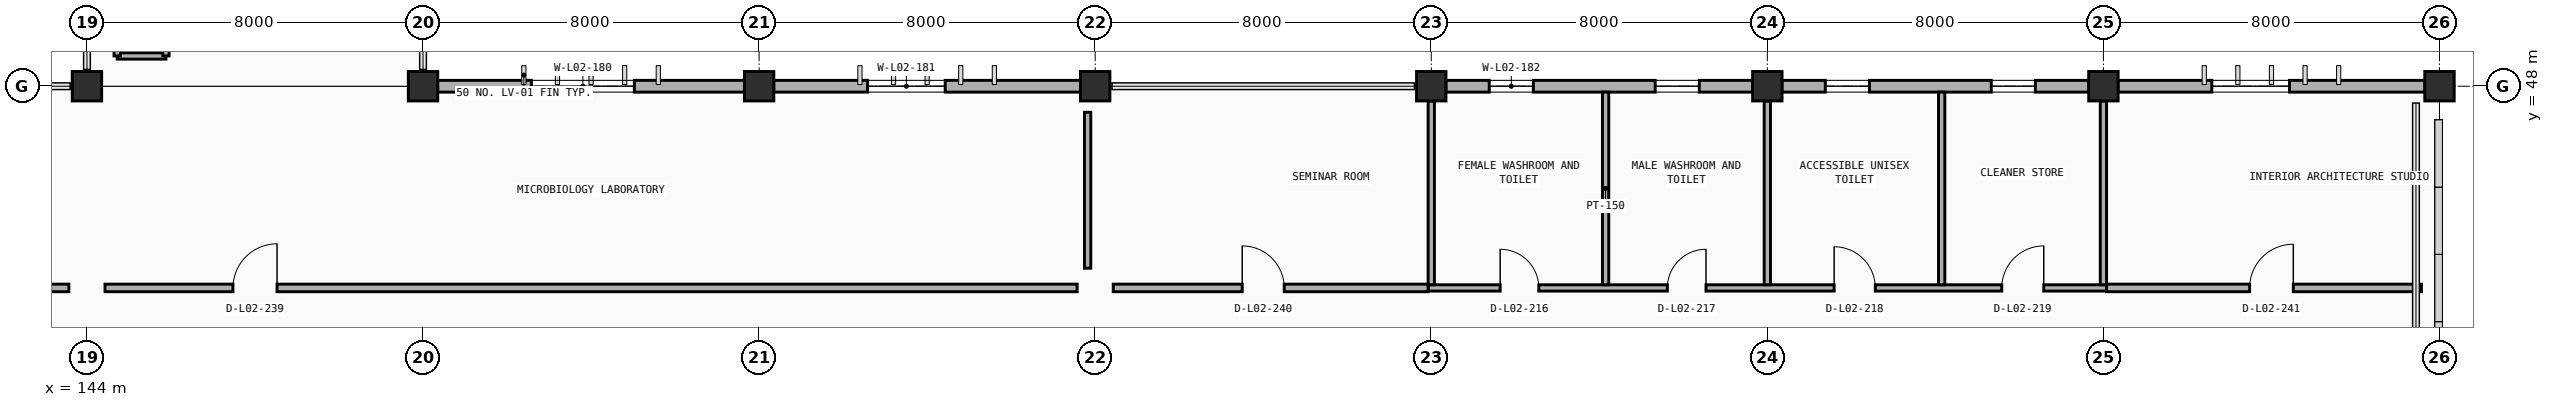
"""IFC4 building model, lengths in metres.
Left out: names, types, materials, properties, quantities, classifications, styles, units other than length and angle.
Written with IfcOpenShell. Run it as: python <this file> out.ifc"""

import sys

from ifc_helpers import new_model, si_unit, direction, frame, frame_2d, origin, origin_2d, place, context, subcontext, project, spatial, rectangle, extrude, element, fill, save


model = new_model("IFC4")
c1 = context("Model", 3, precision=1e-05, world=origin(), true_north=direction((0.0, 1.0)))
c2 = subcontext(c1, "Body", "Model", "MODEL_VIEW")
j1 = project(units=[si_unit("LENGTHUNIT", "METRE"), si_unit("PLANEANGLEUNIT", "RADIAN")], contexts=[c1])
p1 = place(None, origin())
s1 = spatial("IfcSite", under=j1, at=p1, CompositionType="ELEMENT")
p2 = place(p1, origin())
s2 = spatial("IfcBuilding", under=s1, at=p2, CompositionType="ELEMENT")
p3 = place(p2, frame((0.0, 0.0, 4.8)))
s3 = spatial("IfcBuildingStorey", under=s2, at=p3, CompositionType="ELEMENT", Elevation=4.8)
for number, where, z_axis, x_axis in (
    (1, (144.0, 48.0, 0.0), (0.0, 0.0, 1.0), (1.0, 0.0, 0.0)),
    (2, (152.0, 48.0, 0.0), (0.0, 0.0, 1.0), (1.0, 0.0, 0.0)),
    (3, (160.0, 48.0, 0.0), (0.0, 0.0, 1.0), (1.0, 0.0, 0.0)),
    (4, (168.0, 48.0, 0.0), (0.0, 0.0, 1.0), (1.0, 0.0, 0.0)),
    (5, (176.0, 48.0, 0.0), (0.0, 0.0, 1.0), (1.0, 0.0, 0.0)),
    (6, (184.0, 48.0, 0.0), (0.0, 0.0, 1.0), (1.0, 0.0, 0.0)),
    (7, (192.0, 48.0, 0.0), (0.0, 0.0, 1.0), (1.0, 0.0, 0.0)),
    (8, (200.0, 48.0, 0.0), (0.0, 0.0, 1.0), (1.0, 0.0, 0.0)),
):
    element("IfcColumn", number, at=place(p3, frame(where, z_axis=z_axis, x_axis=x_axis)), inside=s3, PredefinedType="COLUMN", context=c2, shape_type="SweptSolid", body=[
        extrude(rectangle(XDim=0.7, YDim=0.7, at=origin_2d()), origin(), (0.0, 0.0, 1.0), 4.8),
    ])
p4 = place(p3, frame((152.347, 48.0, 0.0), z_axis=(0.0, 0.0, 1.0), x_axis=(1.0, 0.0, 0.0)))
e9 = element("IfcWall", 9, at=p4, inside=s3, PredefinedType="STANDARD", context=c2, shape_type="SweptSolid", body=[
    extrude(rectangle(XDim=7.306, YDim=0.28, at=frame_2d((3.653, 0.0))), origin(), (0.0, 0.0, 1.0), 3.91),
])
p5 = place(p4, frame((2.233, 0.0, 0.9)))
e10 = element("IfcOpeningElement", 10, at=p5, cuts=e9, PredefinedType="OPENING", context=c2, shape_type="SweptSolid", body=[
    extrude(rectangle(XDim=2.45, YDim=1.7, at=frame_2d((1.225, 0.85))), frame((0.0, 0.15, 0.0), z_axis=(0.0, -1.0, 0.0), x_axis=(1.0, 0.0, 0.0)), (0.0, 0.0, 1.0), 0.3),
])
p6 = place(p3, frame((160.347, 48.0, 0.0), z_axis=(0.0, 0.0, 1.0), x_axis=(1.0, 0.0, 0.0)))
e11 = element("IfcWall", 11, at=p6, inside=s3, PredefinedType="STANDARD", context=c2, shape_type="SweptSolid", body=[
    extrude(rectangle(XDim=7.306, YDim=0.28, at=frame_2d((3.653, 0.0))), origin(), (0.0, 0.0, 1.0), 3.91),
])
p7 = place(p6, frame((2.233, 0.0, 0.9)))
e12 = element("IfcOpeningElement", 12, at=p7, cuts=e11, PredefinedType="OPENING", context=c2, shape_type="SweptSolid", body=[
    extrude(rectangle(XDim=1.85, YDim=1.7, at=frame_2d((0.925, 0.85))), frame((0.0, 0.15, 0.0), z_axis=(0.0, -1.0, 0.0), x_axis=(1.0, 0.0, 0.0)), (0.0, 0.0, 1.0), 0.3),
])
p8 = place(p3, frame((176.347, 48.0, 0.0), z_axis=(0.0, 0.0, 1.0), x_axis=(1.0, 0.0, 0.0)))
e13 = element("IfcWall", 13, at=p8, inside=s3, PredefinedType="STANDARD", context=c2, shape_type="SweptSolid", body=[
    extrude(rectangle(XDim=7.306, YDim=0.28, at=frame_2d((3.653, 0.0))), origin(), (0.0, 0.0, 1.0), 3.91),
])
p9 = place(p8, frame((1.033, 0.0, 1.15)))
e14 = element("IfcOpeningElement", 14, at=p9, cuts=e13, PredefinedType="OPENING", context=c2, shape_type="SweptSolid", body=[
    extrude(rectangle(XDim=1.05, YDim=1.25, at=frame_2d((0.525, 0.625))), frame((0.0, 0.15, 0.0), z_axis=(0.0, -1.0, 0.0), x_axis=(1.0, 0.0, 0.0)), (0.0, 0.0, 1.0), 0.3),
])
p10 = place(p8, frame((4.983, 0.0, 1.15)))
e15 = element("IfcOpeningElement", 15, at=p10, cuts=e13, PredefinedType="OPENING", context=c2, shape_type="SweptSolid", body=[
    extrude(rectangle(XDim=1.05, YDim=1.25, at=frame_2d((0.525, 0.625))), frame((0.0, 0.15, 0.0), z_axis=(0.0, -1.0, 0.0), x_axis=(1.0, 0.0, 0.0)), (0.0, 0.0, 1.0), 0.3),
])
p11 = place(p3, frame((184.347, 48.0, 0.0), z_axis=(0.0, 0.0, 1.0), x_axis=(1.0, 0.0, 0.0)))
e16 = element("IfcWall", 16, at=p11, inside=s3, PredefinedType="STANDARD", context=c2, shape_type="SweptSolid", body=[
    extrude(rectangle(XDim=7.306, YDim=0.28, at=frame_2d((3.653, 0.0))), origin(), (0.0, 0.0, 1.0), 3.91),
])
p12 = place(p11, frame((1.033, 0.0, 1.15)))
e17 = element("IfcOpeningElement", 17, at=p12, cuts=e16, PredefinedType="OPENING", context=c2, shape_type="SweptSolid", body=[
    extrude(rectangle(XDim=1.05, YDim=1.25, at=frame_2d((0.525, 0.625))), frame((0.0, 0.15, 0.0), z_axis=(0.0, -1.0, 0.0), x_axis=(1.0, 0.0, 0.0)), (0.0, 0.0, 1.0), 0.3),
])
p13 = place(p11, frame((4.983, 0.0, 1.15)))
e18 = element("IfcOpeningElement", 18, at=p13, cuts=e16, PredefinedType="OPENING", context=c2, shape_type="SweptSolid", body=[
    extrude(rectangle(XDim=1.05, YDim=1.25, at=frame_2d((0.525, 0.625))), frame((0.0, 0.15, 0.0), z_axis=(0.0, -1.0, 0.0), x_axis=(1.0, 0.0, 0.0)), (0.0, 0.0, 1.0), 0.3),
])
p14 = place(p3, frame((192.347, 48.0, 0.0), z_axis=(0.0, 0.0, 1.0), x_axis=(1.0, 0.0, 0.0)))
e19 = element("IfcWall", 19, at=p14, inside=s3, PredefinedType="STANDARD", context=c2, shape_type="SweptSolid", body=[
    extrude(rectangle(XDim=7.306, YDim=0.28, at=frame_2d((3.653, 0.0))), origin(), (0.0, 0.0, 1.0), 3.91),
])
p15 = place(p14, frame((2.233, 0.0, 0.9)))
e20 = element("IfcOpeningElement", 20, at=p15, cuts=e19, PredefinedType="OPENING", context=c2, shape_type="SweptSolid", body=[
    extrude(rectangle(XDim=1.85, YDim=1.7, at=frame_2d((0.925, 0.85))), frame((0.0, 0.15, 0.0), z_axis=(0.0, -1.0, 0.0), x_axis=(1.0, 0.0, 0.0)), (0.0, 0.0, 1.0), 0.3),
])
p16 = place(p3, frame((199.76, 47.78, 0.0), z_axis=(0.0, 0.0, 1.0), x_axis=(-1.0, 0.0, 0.0)))
e21 = element("IfcWall", 21, at=p16, inside=s3, PredefinedType="PARAPET", context=c2, shape_type="SweptSolid", body=[
    extrude(rectangle(XDim=0.32, YDim=0.2, at=frame_2d((0.16, 0.0))), origin(), (0.0, 0.0, 1.0), 3.95),
])
for number, where, z_axis, x_axis in (
    (22, (144.72, 48.72, 0.0), (0.0, 0.0, 1.0), (1.0, 0.0, 0.0)),
    (23, (145.88, 48.72, 0.0), (0.0, 0.0, 1.0), (0.0, 1.0, 0.0)),
    (24, (144.72, 49.88, 0.0), (0.0, 0.0, 1.0), (0.0, -1.0, 0.0)),
):
    element("IfcWall", number, at=place(p3, frame(where, z_axis=z_axis, x_axis=x_axis)), inside=s3, PredefinedType="PARTITIONING", context=c2, shape_type="SweptSolid", body=[
        extrude(rectangle(XDim=1.16, YDim=0.15, at=frame_2d((0.58, 0.0))), origin(), (0.0, 0.0, 1.0), 4.5),
    ])
p17 = place(p3, frame((175.925, 43.2, 0.0), z_axis=(0.0, 0.0, 1.0), x_axis=(1.0, 0.0, 0.0)))
e25 = element("IfcWall", 25, at=p17, inside=s3, PredefinedType="PARTITIONING", context=c2, shape_type="SweptSolid", body=[
    extrude(rectangle(XDim=16.15, YDim=0.15, at=frame_2d((8.075, 0.0))), origin(), (0.0, 0.0, 1.0), 3.9),
])
p18 = place(p17, frame((1.715, 0.0, 0.0)))
e26 = element("IfcOpeningElement", 26, at=p18, cuts=e25, PredefinedType="OPENING", context=c2, shape_type="SweptSolid", body=[
    extrude(rectangle(XDim=0.92, YDim=2.12, at=frame_2d((0.46, 1.06))), frame((0.0, 0.085, 0.0), z_axis=(0.0, -1.0, 0.0), x_axis=(1.0, 0.0, 0.0)), (0.0, 0.0, 1.0), 0.17),
])
p19 = place(p17, frame((5.695, 0.0, 0.0)))
e27 = element("IfcOpeningElement", 27, at=p19, cuts=e25, PredefinedType="OPENING", context=c2, shape_type="SweptSolid", body=[
    extrude(rectangle(XDim=0.92, YDim=2.12, at=frame_2d((0.46, 1.06))), frame((0.0, 0.085, 0.0), z_axis=(0.0, -1.0, 0.0), x_axis=(1.0, 0.0, 0.0)), (0.0, 0.0, 1.0), 0.17),
])
p20 = place(p17, frame((9.665, 0.0, 0.0)))
e28 = element("IfcOpeningElement", 28, at=p20, cuts=e25, PredefinedType="OPENING", context=c2, shape_type="SweptSolid", body=[
    extrude(rectangle(XDim=0.98, YDim=2.12, at=frame_2d((0.49, 1.06))), frame((0.0, 0.085, 0.0), z_axis=(0.0, -1.0, 0.0), x_axis=(1.0, 0.0, 0.0)), (0.0, 0.0, 1.0), 0.17),
])
p21 = place(p17, frame((13.655, 0.0, 0.0)))
e29 = element("IfcOpeningElement", 29, at=p21, cuts=e25, PredefinedType="OPENING", context=c2, shape_type="SweptSolid", body=[
    extrude(rectangle(XDim=1.0, YDim=2.15, at=frame_2d((0.5, 1.075))), frame((0.0, 0.085, 0.0), z_axis=(0.0, -1.0, 0.0), x_axis=(1.0, 0.0, 0.0)), (0.0, 0.0, 1.0), 0.17),
])
p22 = place(p3, frame((176.0, 43.275, 0.0), z_axis=(0.0, 0.0, 1.0), x_axis=(0.0, 1.0, 0.0)))
e30 = element("IfcWall", 30, at=p22, inside=s3, PredefinedType="PARTITIONING", context=c2, shape_type="SweptSolid", body=[
    extrude(rectangle(XDim=4.375, YDim=0.15, at=frame_2d((2.188, 0.0))), origin(), (0.0, 0.0, 1.0), 3.76),
])
p23 = place(p3, frame((180.15, 43.275, 0.0), z_axis=(0.0, 0.0, 1.0), x_axis=(0.0, 1.0, 0.0)))
e31 = element("IfcWall", 31, at=p23, inside=s3, PredefinedType="PARTITIONING", context=c2, shape_type="SweptSolid", body=[
    extrude(rectangle(XDim=4.585, YDim=0.15, at=frame_2d((2.292, 0.0))), origin(), (0.0, 0.0, 1.0), 3.9),
])
p24 = place(p3, frame((184.0, 43.275, 0.0), z_axis=(0.0, 0.0, 1.0), x_axis=(0.0, 1.0, 0.0)))
e32 = element("IfcWall", 32, at=p24, inside=s3, PredefinedType="PARTITIONING", context=c2, shape_type="SweptSolid", body=[
    extrude(rectangle(XDim=4.375, YDim=0.15, at=frame_2d((2.188, 0.0))), origin(), (0.0, 0.0, 1.0), 3.76),
])
p25 = place(p3, frame((188.15, 43.275, 0.0), z_axis=(0.0, 0.0, 1.0), x_axis=(0.0, 1.0, 0.0)))
e33 = element("IfcWall", 33, at=p25, inside=s3, PredefinedType="PARTITIONING", context=c2, shape_type="SweptSolid", body=[
    extrude(rectangle(XDim=4.585, YDim=0.15, at=frame_2d((2.292, 0.0))), origin(), (0.0, 0.0, 1.0), 3.9),
])
p26 = place(p3, frame((192.0, 43.275, 0.0), z_axis=(0.0, 0.0, 1.0), x_axis=(0.0, 1.0, 0.0)))
e34 = element("IfcWall", 34, at=p26, inside=s3, PredefinedType="PARTITIONING", context=c2, shape_type="SweptSolid", body=[
    extrude(rectangle(XDim=4.375, YDim=0.15, at=frame_2d((2.188, 0.0))), origin(), (0.0, 0.0, 1.0), 3.76),
])
p27 = place(p3, frame((128.43, 43.2, 0.0), z_axis=(0.0, 0.0, 1.0), x_axis=(1.0, 0.0, 0.0)))
e35 = element("IfcWall", 35, at=p27, inside=s3, PredefinedType="PARTITIONING", context=c2, shape_type="SweptSolid", body=[
    extrude(rectangle(XDim=15.14, YDim=0.18, at=frame_2d((7.57, 0.0))), origin(), (0.0, 0.0, 1.0), 3.9),
])
p28 = place(p27, frame((3.04, 0.0, 0.0)))
e36 = element("IfcOpeningElement", 36, at=p28, cuts=e35, PredefinedType="OPENING", context=c2, shape_type="SweptSolid", body=[
    extrude(rectangle(XDim=1.06, YDim=2.1, at=frame_2d((0.53, 1.05))), frame((0.0, 0.1, 0.0), z_axis=(0.0, -1.0, 0.0), x_axis=(1.0, 0.0, 0.0)), (0.0, 0.0, 1.0), 0.2),
])
p29 = place(p3, frame((144.43, 43.2, 0.0), z_axis=(0.0, 0.0, 1.0), x_axis=(1.0, 0.0, 0.0)))
e37 = element("IfcWall", 37, at=p29, inside=s3, PredefinedType="PARTITIONING", context=c2, shape_type="SweptSolid", body=[
    extrude(rectangle(XDim=23.14, YDim=0.18, at=frame_2d((11.57, 0.0))), origin(), (0.0, 0.0, 1.0), 3.9),
])
p30 = place(p29, frame((3.045, 0.0, 0.0)))
e38 = element("IfcOpeningElement", 38, at=p30, cuts=e37, PredefinedType="OPENING", context=c2, shape_type="SweptSolid", body=[
    extrude(rectangle(XDim=1.05, YDim=2.15, at=frame_2d((0.525, 1.075))), frame((0.0, 0.1, 0.0), z_axis=(0.0, -1.0, 0.0), x_axis=(1.0, 0.0, 0.0)), (0.0, 0.0, 1.0), 0.2),
])
p31 = place(p3, frame((167.82, 43.67, 0.0), z_axis=(0.0, 0.0, 1.0), x_axis=(0.0, 1.0, 0.0)))
e39 = element("IfcWall", 39, at=p31, inside=s3, PredefinedType="PARTITIONING", context=c2, shape_type="SweptSolid", body=[
    extrude(rectangle(XDim=3.71, YDim=0.15, at=frame_2d((1.855, 0.0))), origin(), (0.0, 0.0, 1.0), 3.76),
])
p32 = place(p3, frame((168.43, 43.2, 0.0), z_axis=(0.0, 0.0, 1.0), x_axis=(1.0, 0.0, 0.0)))
e40 = element("IfcWall", 40, at=p32, inside=s3, PredefinedType="PARTITIONING", context=c2, shape_type="SweptSolid", body=[
    extrude(rectangle(XDim=7.495, YDim=0.18, at=frame_2d((3.748, 0.0))), origin(), (0.0, 0.0, 1.0), 3.9),
])
p33 = place(p32, frame((3.07, 0.0, 0.0)))
e41 = element("IfcOpeningElement", 41, at=p33, cuts=e40, PredefinedType="OPENING", context=c2, shape_type="SweptSolid", body=[
    extrude(rectangle(XDim=1.0, YDim=2.15, at=frame_2d((0.5, 1.075))), frame((0.0, 0.1, 0.0), z_axis=(0.0, -1.0, 0.0), x_axis=(1.0, 0.0, 0.0)), (0.0, 0.0, 1.0), 0.2),
])
p34 = place(p3, frame((192.075, 43.2, 0.0), z_axis=(0.0, 0.0, 1.0), x_axis=(1.0, 0.0, 0.0)))
e42 = element("IfcWall", 42, at=p34, inside=s3, PredefinedType="PARTITIONING", context=c2, shape_type="SweptSolid", body=[
    extrude(rectangle(XDim=7.495, YDim=0.18, at=frame_2d((3.748, 0.0))), origin(), (0.0, 0.0, 1.0), 3.9),
])
p35 = place(p34, frame((3.405, 0.0, 0.0)))
e43 = element("IfcOpeningElement", 43, at=p35, cuts=e42, PredefinedType="OPENING", context=c2, shape_type="SweptSolid", body=[
    extrude(rectangle(XDim=1.04, YDim=2.15, at=frame_2d((0.52, 1.075))), frame((0.0, 0.1, 0.0), z_axis=(0.0, -1.0, 0.0), x_axis=(1.0, 0.0, 0.0)), (0.0, 0.0, 1.0), 0.2),
])
p36 = place(p5, origin())
e44 = element("IfcWindow", 44, at=p36, inside=s3, PartitioningType="DOUBLE_PANEL_VERTICAL", PredefinedType="WINDOW", context=c2, shape_type="SweptSolid", body=[
    extrude(rectangle(XDim=2.45, YDim=1.7, at=frame_2d((1.225, 0.85))), frame((0.0, 0.03, 0.0), z_axis=(0.0, -1.0, 0.0), x_axis=(1.0, 0.0, 0.0)), (0.0, 0.0, 1.0), 0.06),
])
fill(e10, e44)
p37 = place(p7, origin())
e45 = element("IfcWindow", 45, at=p37, inside=s3, PartitioningType="DOUBLE_PANEL_VERTICAL", PredefinedType="WINDOW", context=c2, shape_type="SweptSolid", body=[
    extrude(rectangle(XDim=1.85, YDim=1.7, at=frame_2d((0.925, 0.85))), frame((0.0, 0.03, 0.0), z_axis=(0.0, -1.0, 0.0), x_axis=(1.0, 0.0, 0.0)), (0.0, 0.0, 1.0), 0.06),
])
fill(e12, e45)
p38 = place(p9, origin())
e46 = element("IfcWindow", 46, at=p38, inside=s3, PartitioningType="SINGLE_PANEL", PredefinedType="WINDOW", context=c2, shape_type="SweptSolid", body=[
    extrude(rectangle(XDim=1.05, YDim=1.25, at=frame_2d((0.525, 0.625))), frame((0.0, 0.03, 0.0), z_axis=(0.0, -1.0, 0.0), x_axis=(1.0, 0.0, 0.0)), (0.0, 0.0, 1.0), 0.06),
])
fill(e14, e46)
p39 = place(p10, origin())
e47 = element("IfcWindow", 47, at=p39, inside=s3, PartitioningType="SINGLE_PANEL", PredefinedType="WINDOW", context=c2, shape_type="SweptSolid", body=[
    extrude(rectangle(XDim=1.05, YDim=1.25, at=frame_2d((0.525, 0.625))), frame((0.0, 0.03, 0.0), z_axis=(0.0, -1.0, 0.0), x_axis=(1.0, 0.0, 0.0)), (0.0, 0.0, 1.0), 0.06),
])
fill(e15, e47)
p40 = place(p12, origin())
e48 = element("IfcWindow", 48, at=p40, inside=s3, PartitioningType="SINGLE_PANEL", PredefinedType="WINDOW", context=c2, shape_type="SweptSolid", body=[
    extrude(rectangle(XDim=1.05, YDim=1.25, at=frame_2d((0.525, 0.625))), frame((0.0, 0.03, 0.0), z_axis=(0.0, -1.0, 0.0), x_axis=(1.0, 0.0, 0.0)), (0.0, 0.0, 1.0), 0.06),
])
fill(e17, e48)
p41 = place(p13, origin())
e49 = element("IfcWindow", 49, at=p41, inside=s3, PartitioningType="SINGLE_PANEL", PredefinedType="WINDOW", context=c2, shape_type="SweptSolid", body=[
    extrude(rectangle(XDim=1.05, YDim=1.25, at=frame_2d((0.525, 0.625))), frame((0.0, 0.03, 0.0), z_axis=(0.0, -1.0, 0.0), x_axis=(1.0, 0.0, 0.0)), (0.0, 0.0, 1.0), 0.06),
])
fill(e18, e49)
p42 = place(p15, origin())
e50 = element("IfcWindow", 50, at=p42, inside=s3, PartitioningType="DOUBLE_PANEL_VERTICAL", PredefinedType="WINDOW", context=c2, shape_type="SweptSolid", body=[
    extrude(rectangle(XDim=1.85, YDim=1.7, at=frame_2d((0.925, 0.85))), frame((0.0, 0.03, 0.0), z_axis=(0.0, -1.0, 0.0), x_axis=(1.0, 0.0, 0.0)), (0.0, 0.0, 1.0), 0.06),
])
fill(e20, e50)
p43 = place(p18, origin())
e51 = element("IfcDoor", 51, at=p43, inside=s3, OperationType="SINGLE_SWING_LEFT", PredefinedType="DOOR", context=c2, shape_type="SweptSolid", body=[
    extrude(rectangle(XDim=0.92, YDim=2.12, at=frame_2d((0.46, 1.06))), frame((0.0, 0.025, 0.0), z_axis=(0.0, -1.0, 0.0), x_axis=(1.0, 0.0, 0.0)), (0.0, 0.0, 1.0), 0.05),
])
fill(e26, e51)
p44 = place(p19, origin())
e52 = element("IfcDoor", 52, at=p44, inside=s3, OperationType="SINGLE_SWING_RIGHT", PredefinedType="DOOR", context=c2, shape_type="SweptSolid", body=[
    extrude(rectangle(XDim=0.92, YDim=2.12, at=frame_2d((0.46, 1.06))), frame((0.0, 0.025, 0.0), z_axis=(0.0, -1.0, 0.0), x_axis=(1.0, 0.0, 0.0)), (0.0, 0.0, 1.0), 0.05),
])
fill(e27, e52)
p45 = place(p20, origin())
e53 = element("IfcDoor", 53, at=p45, inside=s3, OperationType="SINGLE_SWING_LEFT", PredefinedType="DOOR", context=c2, shape_type="SweptSolid", body=[
    extrude(rectangle(XDim=0.98, YDim=2.12, at=frame_2d((0.49, 1.06))), frame((0.0, 0.025, 0.0), z_axis=(0.0, -1.0, 0.0), x_axis=(1.0, 0.0, 0.0)), (0.0, 0.0, 1.0), 0.05),
])
fill(e28, e53)
p46 = place(p21, origin())
e54 = element("IfcDoor", 54, at=p46, inside=s3, OperationType="SINGLE_SWING_RIGHT", PredefinedType="DOOR", context=c2, shape_type="SweptSolid", body=[
    extrude(rectangle(XDim=1.0, YDim=2.15, at=frame_2d((0.5, 1.075))), frame((0.0, 0.025, 0.0), z_axis=(0.0, -1.0, 0.0), x_axis=(1.0, 0.0, 0.0)), (0.0, 0.0, 1.0), 0.05),
])
fill(e29, e54)
p47 = place(p30, origin())
e55 = element("IfcDoor", 55, at=p47, inside=s3, OperationType="SINGLE_SWING_RIGHT", PredefinedType="DOOR", context=c2, shape_type="SweptSolid", body=[
    extrude(rectangle(XDim=1.05, YDim=2.15, at=frame_2d((0.525, 1.075))), frame((0.0, 0.025, 0.0), z_axis=(0.0, -1.0, 0.0), x_axis=(1.0, 0.0, 0.0)), (0.0, 0.0, 1.0), 0.05),
])
fill(e38, e55)
p48 = place(p33, origin())
e56 = element("IfcDoor", 56, at=p48, inside=s3, OperationType="SINGLE_SWING_LEFT", PredefinedType="DOOR", context=c2, shape_type="SweptSolid", body=[
    extrude(rectangle(XDim=1.0, YDim=2.15, at=frame_2d((0.5, 1.075))), frame((0.0, 0.025, 0.0), z_axis=(0.0, -1.0, 0.0), x_axis=(1.0, 0.0, 0.0)), (0.0, 0.0, 1.0), 0.05),
])
fill(e41, e56)
p49 = place(p35, origin())
e57 = element("IfcDoor", 57, at=p49, inside=s3, OperationType="SINGLE_SWING_RIGHT", PredefinedType="DOOR", context=c2, shape_type="SweptSolid", body=[
    extrude(rectangle(XDim=1.04, YDim=2.15, at=frame_2d((0.52, 1.075))), frame((0.0, 0.025, 0.0), z_axis=(0.0, -1.0, 0.0), x_axis=(1.0, 0.0, 0.0)), (0.0, 0.0, 1.0), 0.05),
])
fill(e43, e57)
save(model, sys.argv[1])
